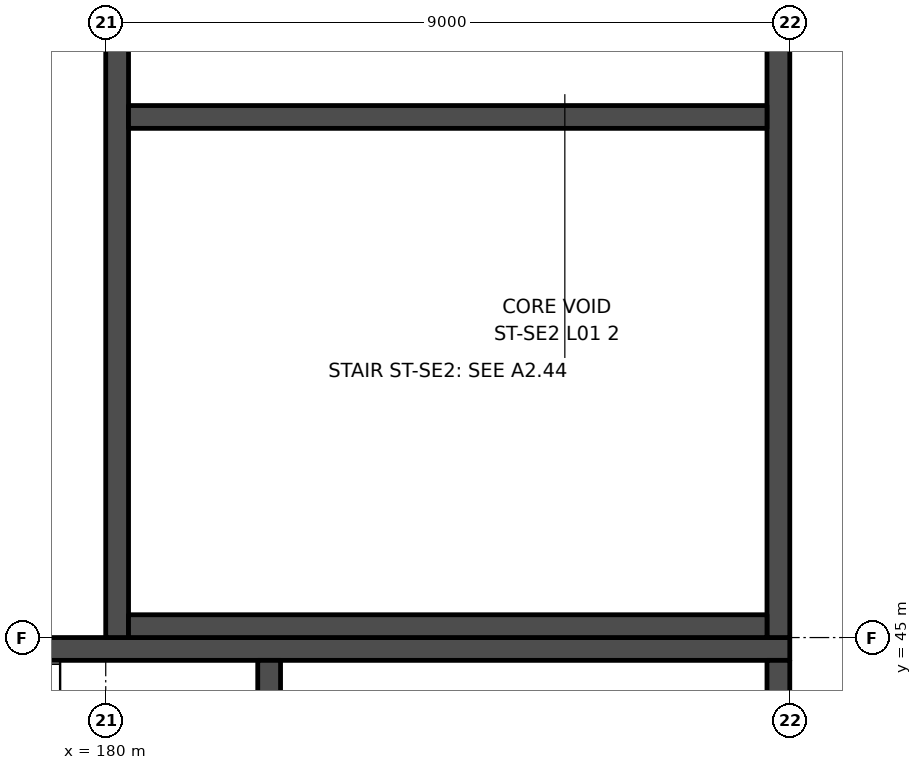
"""IFC4 building model, lengths in metres.
Left out: names, types, materials, properties, quantities, classifications, styles, units other than length and angle.
Written with IfcOpenShell. Run it as: python <this file> out.ifc"""

import sys

from ifc_helpers import new_model, si_unit, direction, frame, frame_2d, origin, place, context, subcontext, project, spatial, rectangle, extrude, element, save


model = new_model("IFC4")
c1 = context("Model", 3, precision=1e-05, world=origin(), true_north=direction((0.0, 1.0)))
c2 = subcontext(c1, "Body", "Model", "MODEL_VIEW")
j1 = project(units=[si_unit("LENGTHUNIT", "METRE"), si_unit("PLANEANGLEUNIT", "RADIAN")], contexts=[c1])
p1 = place(None, origin())
s1 = spatial("IfcSite", under=j1, at=p1, CompositionType="ELEMENT")
p2 = place(p1, origin())
s2 = spatial("IfcBuilding", under=s1, at=p2, CompositionType="ELEMENT")
p3 = place(p2, frame((0.0, 0.0, 7.0)))
s3 = spatial("IfcBuildingStorey", under=s2, at=p3, CompositionType="ELEMENT", Elevation=7.0)
p4 = place(p3, frame((170.75, 44.85, 0.0), z_axis=(0.0, 0.0, 1.0), x_axis=(1.0, 0.0, 0.0)))
e1 = element("IfcWall", 1, at=p4, inside=s3, PredefinedType="SHEAR", context=c2, shape_type="SweptSolid", body=[
    extrude(rectangle(XDim=18.25, YDim=0.3, at=frame_2d((9.125, 0.0))), origin(), (0.0, 0.0, 1.0), 4.5),
])
p5 = place(p4, frame((1.75, 0.0, 0.0)))
e2 = element("IfcOpeningElement", 2, at=p5, cuts=e1, PredefinedType="OPENING", context=c2, shape_type="SweptSolid", body=[
    extrude(rectangle(XDim=1.2, YDim=2.1, at=frame_2d((0.6, 1.05))), frame((0.0, 0.16, 0.0), z_axis=(0.0, -1.0, 0.0), x_axis=(1.0, 0.0, 0.0)), (0.0, 0.0, 1.0), 0.32),
])
for number, where, z_axis, x_axis in (
    (3, (188.85, 44.7, 0.0), (0.0, 0.0, 1.0), (0.0, -1.0, 0.0)),
    (4, (182.15, 44.7, 0.0), (0.0, 0.0, 1.0), (0.0, -1.0, 0.0)),
):
    element("IfcWall", number, at=place(p3, frame(where, z_axis=z_axis, x_axis=x_axis)), inside=s3, PredefinedType="SHEAR", context=c2, shape_type="SweptSolid", body=[
        extrude(rectangle(XDim=8.4, YDim=0.3, at=frame_2d((4.2, 0.0))), origin(), (0.0, 0.0, 1.0), 4.5),
    ])
p6 = place(p3, frame((180.15, 63.0, 0.0), z_axis=(0.0, 0.0, 1.0), x_axis=(0.0, -1.0, 0.0)))
e5 = element("IfcWall", 5, at=p6, inside=s3, PredefinedType="SHEAR", context=c2, shape_type="SweptSolid", body=[
    extrude(rectangle(XDim=18.0, YDim=0.3, at=frame_2d((9.0, 0.0))), origin(), (0.0, 0.0, 1.0), 4.5),
])
p7 = place(p6, frame((1.5, 0.0, 0.0)))
e6 = element("IfcOpeningElement", 6, at=p7, cuts=e5, PredefinedType="OPENING", context=c2, shape_type="SweptSolid", body=[
    extrude(rectangle(XDim=1.2, YDim=2.1, at=frame_2d((0.6, 1.05))), frame((0.0, 0.16, 0.0), z_axis=(0.0, -1.0, 0.0), x_axis=(1.0, 0.0, 0.0)), (0.0, 0.0, 1.0), 0.32),
])
p8 = place(p3, frame((188.85, 63.0, 0.0), z_axis=(0.0, 0.0, 1.0), x_axis=(0.0, -1.0, 0.0)))
e7 = element("IfcWall", 7, at=p8, inside=s3, PredefinedType="SHEAR", context=c2, shape_type="SweptSolid", body=[
    extrude(rectangle(XDim=18.0, YDim=0.3, at=frame_2d((9.0, 0.0))), origin(), (0.0, 0.0, 1.0), 4.5),
])
for number, where, z_axis, x_axis in (
    (8, (180.3, 45.15, 0.0), (0.0, 0.0, 1.0), (1.0, 0.0, 0.0)),
    (9, (180.3, 51.85, 0.0), (0.0, 0.0, 1.0), (1.0, 0.0, 0.0)),
):
    element("IfcWall", number, at=place(p3, frame(where, z_axis=z_axis, x_axis=x_axis)), inside=s3, PredefinedType="SHEAR", context=c2, shape_type="SweptSolid", body=[
        extrude(rectangle(XDim=8.4, YDim=0.3, at=frame_2d((4.2, 0.0))), origin(), (0.0, 0.0, 1.0), 4.5),
    ])
save(model, sys.argv[1])
